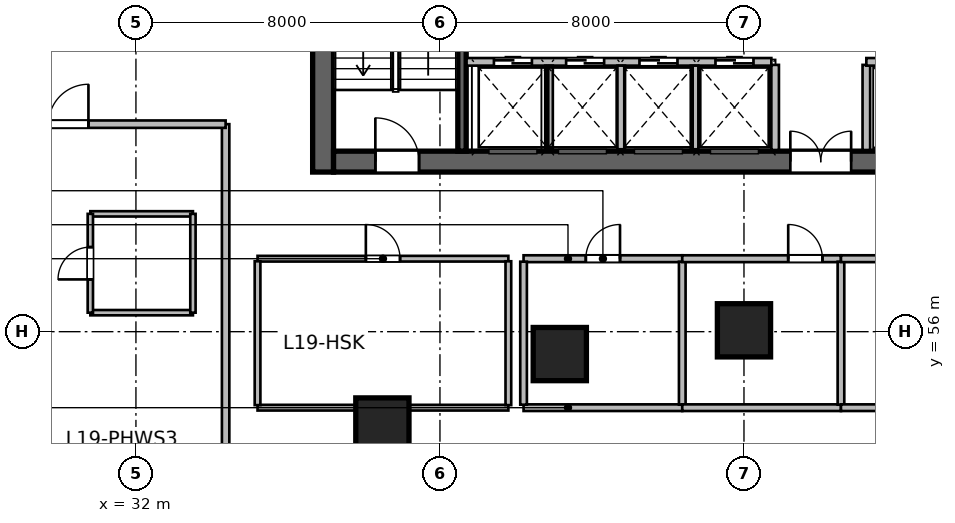
"""IFC4 building model, lengths in metres.
Left out: names, types, materials, properties, quantities, classifications, styles, units other than length and angle.
Written with IfcOpenShell. Run it as: python <this file> out.ifc"""

import sys

from ifc_helpers import new_model, si_unit, direction, frame, frame_2d, origin, origin_2d, place, context, subcontext, project, spatial, rectangle, circle, extrude, source, transform, mapped, element, fill, save


model = new_model("IFC4")
c1 = context("Model", 3, precision=1e-05, world=origin(), true_north=direction((0.0, 1.0)))
c2 = subcontext(c1, "Body", "Model", "MODEL_VIEW")
j1 = project(units=[si_unit("LENGTHUNIT", "METRE"), si_unit("PLANEANGLEUNIT", "RADIAN")], contexts=[c1])
p1 = place(None, origin())
s1 = spatial("IfcSite", under=j1, at=p1, CompositionType="ELEMENT")
p2 = place(p1, origin())
s2 = spatial("IfcBuilding", under=s1, at=p2, CompositionType="ELEMENT")
p3 = place(p2, frame((0.0, 0.0, 82.2)))
s3 = spatial("IfcBuildingStorey", under=s2, at=p3, CompositionType="ELEMENT", Elevation=82.2)
m1 = source(origin(), c2, "Body", "SweptSolid", [
    extrude(rectangle(XDim=12.0, YDim=0.55, at=frame_2d((6.0, 0.0))), origin(), (0.0, 0.0, 1.0), 3.6),
])
p4 = place(p3, frame((36.925, 60.2, 0.0), z_axis=(0.0, 0.0, 1.0), x_axis=(0.0, 1.0, 0.0)))
e1 = element("IfcWall", 1, at=p4, inside=s3, PredefinedType="SHEAR", context=c2, shape_type="MappedRepresentation", body=[
    mapped(m1, transform((0.0, 0.0, 0.0), scale=1.0)),
])
m2 = source(origin(), c2, "Body", "SweptSolid", [
    extrude(rectangle(XDim=21.6, YDim=0.55, at=frame_2d((10.8, 0.0))), origin(), (0.0, 0.0, 1.0), 3.6),
])
p5 = place(p3, frame((37.2, 60.475, 0.0), z_axis=(0.0, 0.0, 1.0), x_axis=(1.0, 0.0, 0.0)))
e2 = element("IfcWall", 2, at=p5, inside=s3, PredefinedType="SHEAR", context=c2, shape_type="MappedRepresentation", body=[
    mapped(m2, transform((0.0, 0.0, 0.0), scale=1.0)),
])
p6 = place(p5, frame((1.1, 0.0, 0.0)))
e3 = element("IfcOpeningElement", 3, at=p6, cuts=e2, PredefinedType="OPENING", context=c2, shape_type="SweptSolid", body=[
    extrude(rectangle(XDim=1.15, YDim=2.15, at=frame_2d((0.575, 1.075))), frame((0.0, 0.285, 0.0), z_axis=(0.0, -1.0, 0.0), x_axis=(1.0, 0.0, 0.0)), (0.0, 0.0, 1.0), 0.57),
])
p7 = place(p5, frame((19.5, 0.0, 0.0)))
e4 = element("IfcOpeningElement", 4, at=p7, cuts=e2, PredefinedType="OPENING", context=c2, shape_type="SweptSolid", body=[
    extrude(rectangle(XDim=0.9, YDim=2.1, at=frame_2d((0.45, 1.05))), frame((0.0, 0.285, 0.0), z_axis=(0.0, -1.0, 0.0), x_axis=(1.0, 0.0, 0.0)), (0.0, 0.0, 1.0), 0.57),
])
p8 = place(p5, frame((12.02, 0.0, 0.0)))
e5 = element("IfcOpeningElement", 5, at=p8, cuts=e2, PredefinedType="OPENING", context=c2, shape_type="SweptSolid", body=[
    extrude(rectangle(XDim=1.6, YDim=2.15, at=frame_2d((0.8, 1.075))), frame((0.0, 0.285, 0.0), z_axis=(0.0, -1.0, 0.0), x_axis=(1.0, 0.0, 0.0)), (0.0, 0.0, 1.0), 0.57),
])
m3 = source(origin(), c2, "Body", "SweptSolid", [
    extrude(rectangle(XDim=10.9, YDim=0.22, at=frame_2d((5.45, 0.0))), origin(), (0.0, 0.0, 1.0), 3.6),
])
p9 = place(p3, frame((40.58, 60.75, 0.0), z_axis=(0.0, 0.0, 1.0), x_axis=(0.0, 1.0, 0.0)))
e6 = element("IfcWall", 6, at=p9, inside=s3, PredefinedType="SHEAR", context=c2, shape_type="MappedRepresentation", body=[
    mapped(m3, transform((0.0, 0.0, 0.0), scale=1.0)),
])
m4 = source(origin(), c2, "Body", "SweptSolid", [
    extrude(circle(Radius=0.7, at=origin_2d()), origin(), (0.0, 0.0, 1.0), 3.6),
])
for number, where, z_axis, x_axis in (
    (7, (38.485, 53.558, 0.0), (0.0, 0.0, 1.0), (-0.289, 0.957, 0.0)),
    (8, (43.154, 55.411, 0.0), (0.0, 0.0, 1.0), (-0.143, 0.99, 0.0)),
    (9, (48.0, 56.036, 0.0), (0.0, 0.0, 1.0), (0.0, 1.0, 0.0)),
):
    element("IfcColumn", number, at=place(p3, frame(where, z_axis=z_axis, x_axis=x_axis)), inside=s3, PredefinedType="COLUMN", context=c2, shape_type="MappedRepresentation", body=[
        mapped(m4, transform((0.0, 0.0, 0.0), scale=1.0)),
    ])
m5 = source(origin(), c2, "Body", "SweptSolid", [
    extrude(rectangle(XDim=2.24, YDim=0.2, at=frame_2d((1.12, 0.0))), origin(), (0.0, 0.0, 1.0), 3.28),
])
for number, where, z_axis, x_axis in (
    (10, (48.82, 60.78, 0.0), (0.0, 0.0, 1.0), (0.0, 1.0, 0.0)),
    (11, (51.22, 60.78, 0.0), (0.0, 0.0, 1.0), (0.0, 1.0, 0.0)),
):
    element("IfcWall", number, at=place(p3, frame(where, z_axis=z_axis, x_axis=x_axis)), inside=s3, PredefinedType="SOLIDWALL", context=c2, shape_type="MappedRepresentation", body=[
        mapped(m5, transform((0.0, 0.0, 0.0), scale=1.0)),
    ])
m6 = source(origin(), c2, "Body", "SweptSolid", [
    extrude(rectangle(XDim=8.02, YDim=0.2, at=frame_2d((4.01, 0.0))), origin(), (0.0, 0.0, 1.0), 3.28),
])
p10 = place(p3, frame((40.7, 63.1, 0.0), z_axis=(0.0, 0.0, 1.0), x_axis=(1.0, 0.0, 0.0)))
e12 = element("IfcWall", 12, at=p10, inside=s3, PredefinedType="SOLIDWALL", context=c2, shape_type="MappedRepresentation", body=[
    mapped(m6, transform((0.0, 0.0, 0.0), scale=1.0)),
])
p11 = place(p10, frame((0.72, 0.0, 0.0)))
e13 = element("IfcOpeningElement", 13, at=p11, cuts=e12, PredefinedType="OPENING", context=c2, shape_type="SweptSolid", body=[
    extrude(rectangle(XDim=1.0, YDim=2.15, at=frame_2d((0.5, 1.075))), frame((0.0, 0.11, 0.0), z_axis=(0.0, -1.0, 0.0), x_axis=(1.0, 0.0, 0.0)), (0.0, 0.0, 1.0), 0.22),
])
p12 = place(p10, frame((2.62, 0.0, 0.0)))
e14 = element("IfcOpeningElement", 14, at=p12, cuts=e12, PredefinedType="OPENING", context=c2, shape_type="SweptSolid", body=[
    extrude(rectangle(XDim=1.0, YDim=2.15, at=frame_2d((0.5, 1.075))), frame((0.0, 0.11, 0.0), z_axis=(0.0, -1.0, 0.0), x_axis=(1.0, 0.0, 0.0)), (0.0, 0.0, 1.0), 0.22),
])
p13 = place(p10, frame((4.55, 0.0, 0.0)))
e15 = element("IfcOpeningElement", 15, at=p13, cuts=e12, PredefinedType="OPENING", context=c2, shape_type="SweptSolid", body=[
    extrude(rectangle(XDim=1.0, YDim=2.15, at=frame_2d((0.5, 1.075))), frame((0.0, 0.11, 0.0), z_axis=(0.0, -1.0, 0.0), x_axis=(1.0, 0.0, 0.0)), (0.0, 0.0, 1.0), 0.22),
])
p14 = place(p10, frame((6.55, 0.0, 0.0)))
e16 = element("IfcOpeningElement", 16, at=p14, cuts=e12, PredefinedType="OPENING", context=c2, shape_type="SweptSolid", body=[
    extrude(rectangle(XDim=1.0, YDim=2.15, at=frame_2d((0.5, 1.075))), frame((0.0, 0.11, 0.0), z_axis=(0.0, -1.0, 0.0), x_axis=(1.0, 0.0, 0.0)), (0.0, 0.0, 1.0), 0.22),
])
m7 = source(origin(), c2, "Body", "SweptSolid", [
    extrude(rectangle(XDim=4.1, YDim=0.2, at=frame_2d((2.05, 0.0))), origin(), (0.0, 0.0, 1.0), 3.28),
])
p15 = place(p3, frame((51.22, 63.1, 0.0), z_axis=(0.0, 0.0, 1.0), x_axis=(1.0, 0.0, 0.0)))
e17 = element("IfcWall", 17, at=p15, inside=s3, PredefinedType="SOLIDWALL", context=c2, shape_type="MappedRepresentation", body=[
    mapped(m7, transform((0.0, 0.0, 0.0), scale=1.0)),
])
m8 = source(origin(), c2, "Body", "SweptSolid", [
    extrude(rectangle(XDim=2.2, YDim=0.2, at=frame_2d((1.1, 0.0))), origin(), (0.0, 0.0, 1.0), 3.28),
])
for number, where, z_axis, x_axis in (
    (18, (42.87, 60.8, 0.0), (0.0, 0.0, 1.0), (0.0, 1.0, 0.0)),
    (19, (44.77, 60.8, 0.0), (0.0, 0.0, 1.0), (0.0, 1.0, 0.0)),
    (20, (46.7, 60.8, 0.0), (0.0, 0.0, 1.0), (0.0, 1.0, 0.0)),
):
    element("IfcWall", number, at=place(p3, frame(where, z_axis=z_axis, x_axis=x_axis)), inside=s3, PredefinedType="SOLIDWALL", context=c2, shape_type="MappedRepresentation", body=[
        mapped(m8, transform((0.0, 0.0, 0.0), scale=1.0)),
    ])
m9 = source(origin(), c2, "Body", "SweptSolid", [
    extrude(rectangle(XDim=6.6, YDim=0.15, at=frame_2d((3.3, 0.0))), origin(), (0.0, 0.0, 1.0), 2.723),
])
p16 = place(p3, frame((35.2, 54.0, 0.0), z_axis=(0.0, 0.0, 1.0), x_axis=(1.0, 0.0, 0.0)))
e21 = element("IfcWall", 21, at=p16, inside=s3, PredefinedType="PARTITIONING", context=c2, shape_type="MappedRepresentation", body=[
    mapped(m9, transform((0.0, 0.0, 0.0), scale=1.0)),
])
m10 = source(origin(), c2, "Body", "SweptSolid", [
    extrude(rectangle(XDim=6.6, YDim=0.15, at=frame_2d((3.3, 0.0))), origin(), (0.0, 0.0, 1.0), 3.28),
])
p17 = place(p3, frame((35.2, 57.92, 0.0), z_axis=(0.0, 0.0, 1.0), x_axis=(1.0, 0.0, 0.0)))
e22 = element("IfcWall", 22, at=p17, inside=s3, PredefinedType="PARTITIONING", context=c2, shape_type="MappedRepresentation", body=[
    mapped(m10, transform((0.0, 0.0, 0.0), scale=1.0)),
])
p18 = place(p17, frame((2.85, 0.0, 0.0)))
e23 = element("IfcOpeningElement", 23, at=p18, cuts=e22, PredefinedType="OPENING", context=c2, shape_type="SweptSolid", body=[
    extrude(rectangle(XDim=0.9, YDim=2.1, at=frame_2d((0.45, 1.05))), frame((0.0, 0.085, 0.0), z_axis=(0.0, -1.0, 0.0), x_axis=(1.0, 0.0, 0.0)), (0.0, 0.0, 1.0), 0.17),
])
m11 = source(origin(), c2, "Body", "SweptSolid", [
    extrude(rectangle(XDim=3.785, YDim=0.15, at=frame_2d((1.893, 0.0))), origin(), (0.0, 0.0, 1.0), 3.28),
])
for number, where, z_axis, x_axis in (
    (24, (35.2, 54.067, 0.0), (0.0, 0.0, 1.0), (0.0, 1.0, 0.0)),
    (25, (41.8, 54.067, 0.0), (0.0, 0.0, 1.0), (0.0, 1.0, 0.0)),
):
    element("IfcWall", number, at=place(p3, frame(where, z_axis=z_axis, x_axis=x_axis)), inside=s3, PredefinedType="PARTITIONING", context=c2, shape_type="MappedRepresentation", body=[
        mapped(m11, transform((0.0, 0.0, 0.0), scale=1.0)),
    ])
m12 = source(origin(), c2, "Body", "SweptSolid", [
    extrude(rectangle(XDim=4.176, YDim=0.175, at=frame_2d((2.088, 0.0))), origin(), (0.0, 0.0, 1.0), 3.28),
])
p19 = place(p3, frame((42.2, 54.0, 0.0), z_axis=(0.0, 0.0, 1.0), x_axis=(1.0, 0.0, 0.0)))
e26 = element("IfcWall", 26, at=p19, inside=s3, PredefinedType="PARTITIONING", context=c2, shape_type="MappedRepresentation", body=[
    mapped(m12, transform((0.0, 0.0, 0.0), scale=1.0)),
])
m13 = source(origin(), c2, "Body", "SweptSolid", [
    extrude(rectangle(XDim=4.176, YDim=0.18, at=frame_2d((2.088, 0.0))), origin(), (0.0, 0.0, 1.0), 3.28),
])
p20 = place(p3, frame((42.2, 57.92, 0.0), z_axis=(0.0, 0.0, 1.0), x_axis=(1.0, 0.0, 0.0)))
e27 = element("IfcWall", 27, at=p20, inside=s3, PredefinedType="PLUMBINGWALL", context=c2, shape_type="MappedRepresentation", body=[
    mapped(m13, transform((0.0, 0.0, 0.0), scale=1.0)),
])
p21 = place(p20, frame((1.638, 0.0, 0.0)))
e28 = element("IfcOpeningElement", 28, at=p21, cuts=e27, PredefinedType="OPENING", context=c2, shape_type="SweptSolid", body=[
    extrude(rectangle(XDim=0.9, YDim=2.08, at=frame_2d((0.45, 1.04))), frame((0.0, 0.1, 0.0), z_axis=(0.0, -1.0, 0.0), x_axis=(1.0, 0.0, 0.0)), (0.0, 0.0, 1.0), 0.2),
])
m14 = source(origin(), c2, "Body", "SweptSolid", [
    extrude(rectangle(XDim=3.763, YDim=0.175, at=frame_2d((1.881, 0.0))), origin(), (0.0, 0.0, 1.0), 3.28),
])
for number, where, z_axis, x_axis in (
    (29, (42.2, 54.079, 0.0), (0.0, 0.0, 1.0), (0.0, 1.0, 0.0)),
    (30, (46.376, 54.079, 0.0), (0.0, 0.0, 1.0), (0.0, 1.0, 0.0)),
):
    element("IfcWall", number, at=place(p3, frame(where, z_axis=z_axis, x_axis=x_axis)), inside=s3, PredefinedType="PARTITIONING", context=c2, shape_type="MappedRepresentation", body=[
        mapped(m14, transform((0.0, 0.0, 0.0), scale=1.0)),
    ])
p22 = place(p3, frame((46.376, 54.0, 0.0), z_axis=(0.0, 0.0, 1.0), x_axis=(1.0, 0.0, 0.0)))
e31 = element("IfcWall", 31, at=p22, inside=s3, PredefinedType="PARTITIONING", context=c2, shape_type="MappedRepresentation", body=[
    mapped(m12, transform((0.0, 0.0, 0.0), scale=1.0)),
])
p23 = place(p3, frame((46.376, 57.92, 0.0), z_axis=(0.0, 0.0, 1.0), x_axis=(1.0, 0.0, 0.0)))
e32 = element("IfcWall", 32, at=p23, inside=s3, PredefinedType="PLUMBINGWALL", context=c2, shape_type="MappedRepresentation", body=[
    mapped(m13, transform((0.0, 0.0, 0.0), scale=1.0)),
])
p24 = place(p23, frame((2.788, 0.0, 0.0)))
e33 = element("IfcOpeningElement", 33, at=p24, cuts=e32, PredefinedType="OPENING", context=c2, shape_type="SweptSolid", body=[
    extrude(rectangle(XDim=0.9, YDim=2.08, at=frame_2d((0.45, 1.04))), frame((0.0, 0.1, 0.0), z_axis=(0.0, -1.0, 0.0), x_axis=(1.0, 0.0, 0.0)), (0.0, 0.0, 1.0), 0.2),
])
p25 = place(p3, frame((50.552, 54.079, 0.0), z_axis=(0.0, 0.0, 1.0), x_axis=(0.0, 1.0, 0.0)))
e34 = element("IfcWall", 34, at=p25, inside=s3, PredefinedType="PARTITIONING", context=c2, shape_type="MappedRepresentation", body=[
    mapped(m14, transform((0.0, 0.0, 0.0), scale=1.0)),
])
m15 = source(origin(), c2, "Body", "SweptSolid", [
    extrude(rectangle(XDim=3.248, YDim=0.175, at=frame_2d((1.624, 0.0))), origin(), (0.0, 0.0, 1.0), 3.28),
])
p26 = place(p3, frame((50.552, 54.0, 0.0), z_axis=(0.0, 0.0, 1.0), x_axis=(1.0, 0.0, 0.0)))
e35 = element("IfcWall", 35, at=p26, inside=s3, PredefinedType="PARTITIONING", context=c2, shape_type="MappedRepresentation", body=[
    mapped(m15, transform((0.0, 0.0, 0.0), scale=1.0)),
])
m16 = source(origin(), c2, "Body", "SweptSolid", [
    extrude(rectangle(XDim=3.248, YDim=0.18, at=frame_2d((1.624, 0.0))), origin(), (0.0, 0.0, 1.0), 3.28),
])
p27 = place(p3, frame((50.552, 57.92, 0.0), z_axis=(0.0, 0.0, 1.0), x_axis=(1.0, 0.0, 0.0)))
e36 = element("IfcWall", 36, at=p27, inside=s3, PredefinedType="PLUMBINGWALL", context=c2, shape_type="MappedRepresentation", body=[
    mapped(m16, transform((0.0, 0.0, 0.0), scale=1.0)),
])
p28 = place(p27, frame((1.149, 0.0, 0.0)))
e37 = element("IfcOpeningElement", 37, at=p28, cuts=e36, PredefinedType="OPENING", context=c2, shape_type="SweptSolid", body=[
    extrude(rectangle(XDim=0.95, YDim=2.12, at=frame_2d((0.475, 1.06))), frame((0.0, 0.1, 0.0), z_axis=(0.0, -1.0, 0.0), x_axis=(1.0, 0.0, 0.0)), (0.0, 0.0, 1.0), 0.2),
])
m17 = source(origin(), c2, "Body", "SweptSolid", [
    extrude(rectangle(XDim=16.134, YDim=0.195, at=frame_2d((8.067, 0.0))), origin(), (0.0, 0.0, 1.0), 3.28),
])
p29 = place(p3, frame((34.36, 45.326, 0.0), z_axis=(0.0, 0.0, 1.0), x_axis=(0.0, 1.0, 0.0)))
e38 = element("IfcWall", 38, at=p29, inside=s3, PredefinedType="PARTITIONING", context=c2, shape_type="MappedRepresentation", body=[
    mapped(m17, transform((0.0, 0.0, 0.0), scale=1.0)),
])
m18 = source(origin(), c2, "Body", "SweptSolid", [
    extrude(rectangle(XDim=12.4, YDim=0.195, at=frame_2d((6.2, 0.0))), origin(), (0.0, 0.0, 1.0), 3.28),
])
p30 = place(p3, frame((21.96, 61.46, 0.0), z_axis=(0.0, 0.0, 1.0), x_axis=(1.0, 0.0, 0.0)))
e39 = element("IfcWall", 39, at=p30, inside=s3, PredefinedType="PARTITIONING", context=c2, shape_type="MappedRepresentation", body=[
    mapped(m18, transform((0.0, 0.0, 0.0), scale=1.0)),
])
p31 = place(p30, frame((0.74, 0.0, 0.0)))
e40 = element("IfcOpeningElement", 40, at=p31, cuts=e39, PredefinedType="OPENING", context=c2, shape_type="SweptSolid", body=[
    extrude(rectangle(XDim=1.05, YDim=2.15, at=frame_2d((0.525, 1.075))), frame((0.0, 0.107, 0.0), z_axis=(0.0, -1.0, 0.0), x_axis=(1.0, 0.0, 0.0)), (0.0, 0.0, 1.0), 0.215),
])
p32 = place(p30, frame((5.675, 0.0, 0.0)))
e41 = element("IfcOpeningElement", 41, at=p32, cuts=e39, PredefinedType="OPENING", context=c2, shape_type="SweptSolid", body=[
    extrude(rectangle(XDim=1.05, YDim=2.15, at=frame_2d((0.525, 1.075))), frame((0.0, 0.107, 0.0), z_axis=(0.0, -1.0, 0.0), x_axis=(1.0, 0.0, 0.0)), (0.0, 0.0, 1.0), 0.215),
])
p33 = place(p30, frame((7.74, 0.0, 0.0)))
e42 = element("IfcOpeningElement", 42, at=p33, cuts=e39, PredefinedType="OPENING", context=c2, shape_type="SweptSolid", body=[
    extrude(rectangle(XDim=1.05, YDim=2.15, at=frame_2d((0.525, 1.075))), frame((0.0, 0.107, 0.0), z_axis=(0.0, -1.0, 0.0), x_axis=(1.0, 0.0, 0.0)), (0.0, 0.0, 1.0), 0.215),
])
m19 = source(origin(), c2, "Body", "SweptSolid", [
    extrude(rectangle(XDim=2.7, YDim=0.14, at=frame_2d((1.35, 0.0))), origin(), (0.0, 0.0, 1.0), 3.28),
])
for number, where, z_axis, x_axis in (
    (43, (30.8, 59.1, 0.0), (0.0, 0.0, 1.0), (1.0, 0.0, 0.0)),
    (44, (30.8, 56.5, 0.0), (0.0, 0.0, 1.0), (1.0, 0.0, 0.0)),
):
    element("IfcWall", number, at=place(p3, frame(where, z_axis=z_axis, x_axis=x_axis)), inside=s3, PredefinedType="PARTITIONING", context=c2, shape_type="MappedRepresentation", body=[
        mapped(m19, transform((0.0, 0.0, 0.0), scale=1.0)),
    ])
m20 = source(origin(), c2, "Body", "SweptSolid", [
    extrude(rectangle(XDim=2.6, YDim=0.14, at=frame_2d((1.3, 0.0))), origin(), (0.0, 0.0, 1.0), 2.564),
])
p34 = place(p3, frame((30.8, 56.5, 0.0), z_axis=(0.0, 0.0, 1.0), x_axis=(0.0, 1.0, 0.0)))
e45 = element("IfcWall", 45, at=p34, inside=s3, PredefinedType="PARTITIONING", context=c2, shape_type="MappedRepresentation", body=[
    mapped(m20, transform((0.0, 0.0, 0.0), scale=1.0)),
])
p35 = place(p34, frame((0.875, 0.0, 0.0)))
e46 = element("IfcOpeningElement", 46, at=p35, cuts=e45, PredefinedType="OPENING", context=c2, shape_type="SweptSolid", body=[
    extrude(rectangle(XDim=0.85, YDim=2.05, at=frame_2d((0.425, 1.025))), frame((0.0, 0.08, 0.0), z_axis=(0.0, -1.0, 0.0), x_axis=(1.0, 0.0, 0.0)), (0.0, 0.0, 1.0), 0.16),
])
m21 = source(origin(), c2, "Body", "SweptSolid", [
    extrude(rectangle(XDim=2.6, YDim=0.14, at=frame_2d((1.3, 0.0))), origin(), (0.0, 0.0, 1.0), 3.28),
])
p36 = place(p3, frame((33.5, 56.5, 0.0), z_axis=(0.0, 0.0, 1.0), x_axis=(0.0, 1.0, 0.0)))
e47 = element("IfcWall", 47, at=p36, inside=s3, PredefinedType="PARTITIONING", context=c2, shape_type="MappedRepresentation", body=[
    mapped(m21, transform((0.0, 0.0, 0.0), scale=1.0)),
])
m22 = source(origin(), c2, "Body", "SweptSolid", [
    extrude(rectangle(XDim=1.15, YDim=2.15, at=frame_2d((0.575, 1.075))), frame((0.0, 0.025, 0.0), z_axis=(0.0, -1.0, 0.0), x_axis=(1.0, 0.0, 0.0)), (0.0, 0.0, 1.0), 0.05),
])
p37 = place(p6, origin())
e48 = element("IfcDoor", 48, at=p37, inside=s3, OperationType="SINGLE_SWING_LEFT", PredefinedType="DOOR", context=c2, shape_type="MappedRepresentation", body=[
    mapped(m22, transform((0.0, 0.0, 0.0), scale=1.0)),
])
fill(e3, e48)
m23 = source(origin(), c2, "Body", "SweptSolid", [
    extrude(rectangle(XDim=1.6, YDim=2.15, at=frame_2d((0.8, 1.075))), frame((0.0, 0.025, 0.0), z_axis=(0.0, -1.0, 0.0), x_axis=(1.0, 0.0, 0.0)), (0.0, 0.0, 1.0), 0.05),
])
p38 = place(p8, origin())
e49 = element("IfcDoor", 49, at=p38, inside=s3, OperationType="DOUBLE_DOOR_SINGLE_SWING", PredefinedType="DOOR", context=c2, shape_type="MappedRepresentation", body=[
    mapped(m23, transform((0.0, 0.0, 0.0), scale=1.0)),
])
fill(e5, e49)
m24 = source(origin(), c2, "Body", "SweptSolid", [
    extrude(rectangle(XDim=1.0, YDim=2.15, at=frame_2d((0.5, 1.075))), frame((0.0, 0.025, 0.0), z_axis=(0.0, -1.0, 0.0), x_axis=(1.0, 0.0, 0.0)), (0.0, 0.0, 1.0), 0.05),
])
p39 = place(p11, origin())
e50 = element("IfcDoor", 50, at=p39, inside=s3, OperationType="DOUBLE_DOOR_SLIDING", PredefinedType="DOOR", context=c2, shape_type="MappedRepresentation", body=[
    mapped(m24, transform((0.0, 0.0, 0.0), scale=1.0)),
])
fill(e13, e50)
p40 = place(p12, origin())
e51 = element("IfcDoor", 51, at=p40, inside=s3, OperationType="DOUBLE_DOOR_SLIDING", PredefinedType="DOOR", context=c2, shape_type="MappedRepresentation", body=[
    mapped(m24, transform((0.0, 0.0, 0.0), scale=1.0)),
])
fill(e14, e51)
p41 = place(p13, origin())
e52 = element("IfcDoor", 52, at=p41, inside=s3, OperationType="DOUBLE_DOOR_SLIDING", PredefinedType="DOOR", context=c2, shape_type="MappedRepresentation", body=[
    mapped(m24, transform((0.0, 0.0, 0.0), scale=1.0)),
])
fill(e15, e52)
p42 = place(p14, origin())
e53 = element("IfcDoor", 53, at=p42, inside=s3, OperationType="DOUBLE_DOOR_SLIDING", PredefinedType="DOOR", context=c2, shape_type="MappedRepresentation", body=[
    mapped(m24, transform((0.0, 0.0, 0.0), scale=1.0)),
])
fill(e16, e53)
m25 = source(origin(), c2, "Body", "SweptSolid", [
    extrude(rectangle(XDim=0.9, YDim=2.1, at=frame_2d((0.45, 1.05))), frame((0.0, 0.025, 0.0), z_axis=(0.0, -1.0, 0.0), x_axis=(1.0, 0.0, 0.0)), (0.0, 0.0, 1.0), 0.05),
])
p43 = place(p18, origin())
e54 = element("IfcDoor", 54, at=p43, inside=s3, OperationType="SINGLE_SWING_LEFT", PredefinedType="DOOR", context=c2, shape_type="MappedRepresentation", body=[
    mapped(m25, transform((0.0, 0.0, 0.0), scale=1.0)),
])
fill(e23, e54)
m26 = source(origin(), c2, "Body", "SweptSolid", [
    extrude(rectangle(XDim=0.9, YDim=2.08, at=frame_2d((0.45, 1.04))), frame((0.0, 0.025, 0.0), z_axis=(0.0, -1.0, 0.0), x_axis=(1.0, 0.0, 0.0)), (0.0, 0.0, 1.0), 0.05),
])
p44 = place(p21, origin())
e55 = element("IfcDoor", 55, at=p44, inside=s3, OperationType="SINGLE_SWING_RIGHT", PredefinedType="DOOR", context=c2, shape_type="MappedRepresentation", body=[
    mapped(m26, transform((0.0, 0.0, 0.0), scale=1.0)),
])
fill(e28, e55)
p45 = place(p24, origin())
e56 = element("IfcDoor", 56, at=p45, inside=s3, OperationType="SINGLE_SWING_LEFT", PredefinedType="DOOR", context=c2, shape_type="MappedRepresentation", body=[
    mapped(m26, transform((0.0, 0.0, 0.0), scale=1.0)),
])
fill(e33, e56)
m27 = source(origin(), c2, "Body", "SweptSolid", [
    extrude(rectangle(XDim=1.05, YDim=2.15, at=frame_2d((0.525, 1.075))), frame((0.0, 0.025, 0.0), z_axis=(0.0, -1.0, 0.0), x_axis=(1.0, 0.0, 0.0)), (0.0, 0.0, 1.0), 0.05),
])
p46 = place(p33, origin())
e57 = element("IfcDoor", 57, at=p46, inside=s3, OperationType="SINGLE_SWING_RIGHT", PredefinedType="DOOR", context=c2, shape_type="MappedRepresentation", body=[
    mapped(m27, transform((0.0, 0.0, 0.0), scale=1.0)),
])
fill(e42, e57)
m28 = source(origin(), c2, "Body", "SweptSolid", [
    extrude(rectangle(XDim=0.85, YDim=2.05, at=frame_2d((0.425, 1.025))), frame((0.0, 0.025, 0.0), z_axis=(0.0, -1.0, 0.0), x_axis=(1.0, 0.0, 0.0)), (0.0, 0.0, 1.0), 0.05),
])
p47 = place(p35, origin())
e58 = element("IfcDoor", 58, at=p47, inside=s3, OperationType="SINGLE_SWING_LEFT", PredefinedType="DOOR", context=c2, shape_type="MappedRepresentation", body=[
    mapped(m28, transform((0.0, 0.0, 0.0), scale=1.0)),
])
fill(e46, e58)
save(model, sys.argv[1])
